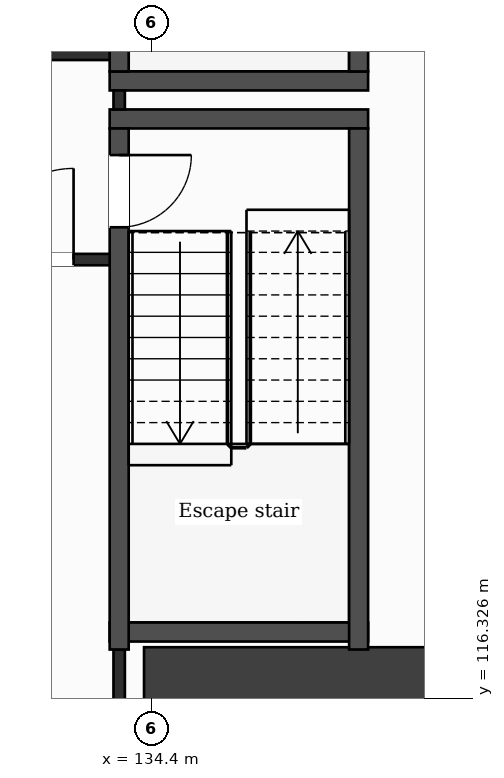
"""IFC4 building model, lengths in metres.
Left out: names, types, materials, properties, quantities, classifications, styles, units other than length and angle.
Written with IfcOpenShell. Run it as: python <this file> out.ifc"""

import sys

from ifc_helpers import new_model, si_unit, direction, frame, frame_2d, origin, place, context, subcontext, project, spatial, rectangle, extrude, element, fill, save


model = new_model("IFC4")
c1 = context("Model", 3, precision=1e-05, world=origin(), true_north=direction((0.0, 1.0)))
c2 = subcontext(c1, "Body", "Model", "MODEL_VIEW")
j1 = project(units=[si_unit("LENGTHUNIT", "METRE"), si_unit("PLANEANGLEUNIT", "RADIAN")], contexts=[c1])
p1 = place(None, origin())
s1 = spatial("IfcSite", under=j1, at=p1, CompositionType="ELEMENT")
p2 = place(p1, origin())
s2 = spatial("IfcBuilding", under=s1, at=p2, CompositionType="ELEMENT")
p3 = place(p2, frame((0.0, 0.0, 116.9)))
s3 = spatial("IfcBuildingStorey", under=s2, at=p3, CompositionType="ELEMENT", Elevation=116.9)
p4 = place(p3, frame((137.732, 131.9, 0.0), z_axis=(0.0, 0.0, 1.0), x_axis=(0.133411141623, -0.991060778808, 0.0)))
e1 = element("IfcWall", 1, at=p4, inside=s3, PredefinedType="SHEAR", context=c2, shape_type="SweptSolid", body=[
    extrude(rectangle(XDim=21.189, YDim=1.0, at=frame_2d((10.595, 0.0))), origin(), (0.0, 0.0, 1.0), 3.7),
])
p5 = place(p3, frame((134.3, 116.5, 0.0), z_axis=(0.0, 0.0, 1.0), x_axis=(1.0, 0.0, 0.0)))
e2 = element("IfcWall", 2, at=p5, inside=s3, PredefinedType="SHEAR", context=c2, shape_type="SweptSolid", body=[
    extrude(rectangle(XDim=5.077, YDim=1.0, at=frame_2d((2.539, 0.0))), origin(), (0.0, 0.0, 1.0), 3.7),
])
p6 = place(p3, frame((133.848, 117.2, 0.0), z_axis=(0.0, 0.0, 1.0), x_axis=(1.0, 0.0, 0.0)))
e3 = element("IfcWall", 3, at=p6, inside=s3, PredefinedType="PARTITIONING", context=c2, shape_type="SweptSolid", body=[
    extrude(rectangle(XDim=3.4, YDim=0.25, at=frame_2d((1.7, 0.0))), origin(), (0.0, 0.0, 1.0), 3.38),
])
p7 = place(p3, frame((131.573, 122.1, 0.0), z_axis=(0.0, 0.0, 1.0), x_axis=(1.0, 0.0, 0.0)))
e4 = element("IfcWall", 4, at=p7, inside=s3, PredefinedType="PARTITIONING", context=c2, shape_type="SweptSolid", body=[
    extrude(rectangle(XDim=2.4, YDim=0.15, at=frame_2d((1.2, 0.0))), origin(), (0.0, 0.0, 1.0), 3.38),
])
p8 = place(p7, frame((0.6, 0.0, 0.0)))
e5 = element("IfcOpeningElement", 5, at=p8, cuts=e4, PredefinedType="OPENING", context=c2, shape_type="SweptSolid", body=[
    extrude(rectangle(XDim=1.2, YDim=2.1, at=frame_2d((0.6, 1.05))), frame((0.0, 0.085, 0.0), z_axis=(0.0, -1.0, 0.0), x_axis=(1.0, 0.0, 0.0)), (0.0, 0.0, 1.0), 0.17),
])
for number, where, z_axis, x_axis in (
    (6, (133.848, 123.95, 0.0), (0.0, 0.0, 1.0), (1.0, 0.0, 0.0)),
    (7, (133.848, 124.45, 0.0), (0.0, 0.0, 1.0), (1.0, 0.0, 0.0)),
):
    element("IfcWall", number, at=place(p3, frame(where, z_axis=z_axis, x_axis=x_axis)), inside=s3, PredefinedType="PARTITIONING", context=c2, shape_type="SweptSolid", body=[
        extrude(rectangle(XDim=3.4, YDim=0.25, at=frame_2d((1.7, 0.0))), origin(), (0.0, 0.0, 1.0), 3.38),
    ])
p9 = place(p3, frame((131.649, 124.8, 0.0), z_axis=(0.0, 0.0, 1.0), x_axis=(1.0, 0.0, 0.0)))
e8 = element("IfcWall", 8, at=p9, inside=s3, PredefinedType="PARTITIONING", context=c2, shape_type="SweptSolid", body=[
    extrude(rectangle(XDim=2.449, YDim=0.15, at=frame_2d((1.225, 0.0))), origin(), (0.0, 0.0, 1.0), 3.38),
])
p10 = place(p3, frame((133.973, 116.0, 0.0), z_axis=(0.0, 0.0, 1.0), x_axis=(0.0, 1.0, 0.0)))
e9 = element("IfcWall", 9, at=p10, inside=s3, PredefinedType="PARTITIONING", context=c2, shape_type="SweptSolid", body=[
    extrude(rectangle(XDim=0.97, YDim=0.15, at=frame_2d((0.485, 0.0))), origin(), (0.0, 0.0, 1.0), 3.38),
])
p11 = place(p3, frame((133.973, 124.075, 0.0), z_axis=(0.0, 0.0, 1.0), x_axis=(0.0, 1.0, 0.0)))
e10 = element("IfcWall", 10, at=p11, inside=s3, PredefinedType="PARTITIONING", context=c2, shape_type="SweptSolid", body=[
    extrude(rectangle(XDim=0.25, YDim=0.15, at=frame_2d((0.125, 0.0))), origin(), (0.0, 0.0, 1.0), 3.38),
])
p12 = place(p3, frame((133.973, 116.97, 0.0), z_axis=(0.0, 0.0, 1.0), x_axis=(0.0, 1.0, 0.0)))
e11 = element("IfcWall", 11, at=p12, inside=s3, PredefinedType="PARTITIONING", context=c2, shape_type="SweptSolid", body=[
    extrude(rectangle(XDim=6.855, YDim=0.25, at=frame_2d((3.427, 0.0))), origin(), (0.0, 0.0, 1.0), 3.38),
])
p13 = place(p12, frame((5.555, 0.0, 0.0)))
e12 = element("IfcOpeningElement", 12, at=p13, cuts=e11, PredefinedType="OPENING", context=c2, shape_type="SweptSolid", body=[
    extrude(rectangle(XDim=0.95, YDim=2.1, at=frame_2d((0.475, 1.05))), frame((0.0, 0.135, 0.0), z_axis=(0.0, -1.0, 0.0), x_axis=(1.0, 0.0, 0.0)), (0.0, 0.0, 1.0), 0.27),
])
p14 = place(p3, frame((133.973, 124.575, 0.0), z_axis=(0.0, 0.0, 1.0), x_axis=(0.0, 1.0, 0.0)))
e13 = element("IfcWall", 13, at=p14, inside=s3, PredefinedType="PARTITIONING", context=c2, shape_type="SweptSolid", body=[
    extrude(rectangle(XDim=6.855, YDim=0.25, at=frame_2d((3.427, 0.0))), origin(), (0.0, 0.0, 1.0), 3.38),
])
p15 = place(p14, frame((5.325, 0.0, 0.0)))
e14 = element("IfcOpeningElement", 14, at=p15, cuts=e13, PredefinedType="OPENING", context=c2, shape_type="SweptSolid", body=[
    extrude(rectangle(XDim=1.0, YDim=2.1, at=frame_2d((0.5, 1.05))), frame((0.0, 0.135, 0.0), z_axis=(0.0, -1.0, 0.0), x_axis=(1.0, 0.0, 0.0)), (0.0, 0.0, 1.0), 0.27),
])
for number, where, z_axis, x_axis in (
    (15, (137.123, 116.97, 0.0), (0.0, 0.0, 1.0), (0.0, 1.0, 0.0)),
    (16, (137.123, 124.575, 0.0), (0.0, 0.0, 1.0), (0.0, 1.0, 0.0)),
):
    element("IfcWall", number, at=place(p3, frame(where, z_axis=z_axis, x_axis=x_axis)), inside=s3, PredefinedType="PARTITIONING", context=c2, shape_type="SweptSolid", body=[
        extrude(rectangle(XDim=6.855, YDim=0.25, at=frame_2d((3.427, 0.0))), origin(), (0.0, 0.0, 1.0), 3.38),
    ])
p16 = place(p8, origin())
e17 = element("IfcDoor", 17, at=p16, inside=s3, OperationType="SINGLE_SWING_RIGHT", PredefinedType="DOOR", context=c2, shape_type="SweptSolid", body=[
    extrude(rectangle(XDim=1.2, YDim=2.1, at=frame_2d((0.6, 1.05))), frame((0.0, 0.025, 0.0), z_axis=(0.0, -1.0, 0.0), x_axis=(1.0, 0.0, 0.0)), (0.0, 0.0, 1.0), 0.05),
])
fill(e5, e17)
p17 = place(p13, origin())
e18 = element("IfcDoor", 18, at=p17, inside=s3, OperationType="SINGLE_SWING_RIGHT", PredefinedType="DOOR", context=c2, shape_type="SweptSolid", body=[
    extrude(rectangle(XDim=0.95, YDim=2.1, at=frame_2d((0.475, 1.05))), frame((0.0, 0.025, 0.0), z_axis=(0.0, -1.0, 0.0), x_axis=(1.0, 0.0, 0.0)), (0.0, 0.0, 1.0), 0.05),
])
fill(e12, e18)
save(model, sys.argv[1])
